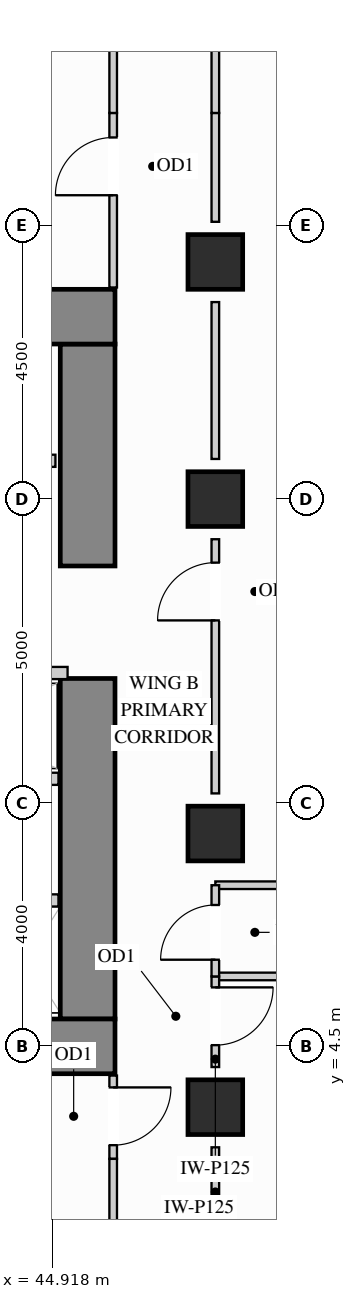
"""IFC4 building model, lengths in metres.
Left out: names, types, materials, properties, quantities, classifications, styles, units other than length and angle.
Written with IfcOpenShell. Run it as: python <this file> out.ifc"""

import sys

from ifc_helpers import new_model, si_unit, direction, frame, frame_2d, origin, origin_2d, place, context, subcontext, project, spatial, rectangle, extrude, source, transform, mapped, element, fill, save


model = new_model("IFC4")
c1 = context("Model", 3, precision=1e-05, world=origin(), true_north=direction((0.0, 1.0)))
c2 = subcontext(c1, "Body", "Model", "MODEL_VIEW")
j1 = project(units=[si_unit("LENGTHUNIT", "METRE"), si_unit("PLANEANGLEUNIT", "RADIAN")], contexts=[c1])
p1 = place(None, origin())
s1 = spatial("IfcSite", under=j1, at=p1, CompositionType="ELEMENT")
p2 = place(p1, origin())
s2 = spatial("IfcBuilding", under=s1, at=p2, CompositionType="ELEMENT")
p3 = place(p2, frame((0.0, 0.0, 22.5)))
s3 = spatial("IfcBuildingStorey", under=s2, at=p3, CompositionType="ELEMENT", Elevation=22.5)
m1 = source(origin(), c2, "Body", "SweptSolid", [
    extrude(rectangle(XDim=0.9, YDim=0.9, at=origin_2d()), origin(), (0.0, 0.0, 1.0), 3.38),
])
for number, where, z_axis, x_axis in (
    (1, (47.6, 13.5, 0.0), (0.0, 0.0, 1.0), (1.0, 0.0, 0.0)),
    (2, (47.6, 3.5, 0.0), (0.0, 0.0, 1.0), (1.0, 0.0, 0.0)),
    (3, (47.6, 8.0, 0.0), (0.0, 0.0, 1.0), (1.0, 0.0, 0.0)),
    (4, (47.6, 17.4, 0.0), (0.0, 0.0, 1.0), (1.0, 0.0, 0.0)),
):
    element("IfcColumn", number, at=place(p3, frame(where, z_axis=z_axis, x_axis=x_axis)), inside=s3, PredefinedType="COLUMN", context=c2, shape_type="MappedRepresentation", body=[
        mapped(m1, transform((0.0, 0.0, 0.0), x_axis=(1.0, 0.0, 0.0), y_axis=(0.0, 1.0, 0.0), z_axis=(0.0, 0.0, 1.0))),
    ])
m2 = source(origin(), c2, "Body", "SweptSolid", [
    extrude(rectangle(XDim=5.6, YDim=0.9, at=frame_2d((2.8, 0.0))), origin(), (0.0, 0.0, 1.0), 3.38),
])
p4 = place(p3, frame((45.5, 4.95, 0.0), z_axis=(0.0, 0.0, 1.0), x_axis=(0.0, 1.0, 0.0)))
e5 = element("IfcWall", 5, at=p4, inside=s3, PredefinedType="SHEAR", context=c2, shape_type="MappedRepresentation", body=[
    mapped(m2, transform((0.0, 0.0, 0.0), x_axis=(1.0, 0.0, 0.0), y_axis=(0.0, 1.0, 0.0), z_axis=(0.0, 0.0, 1.0))),
])
m3 = source(origin(), c2, "Body", "SweptSolid", [
    extrude(rectangle(XDim=3.65, YDim=0.9, at=frame_2d((1.825, 0.0))), origin(), (0.0, 0.0, 1.0), 3.38),
])
p5 = place(p3, frame((45.5, 12.4, 0.0), z_axis=(0.0, 0.0, 1.0), x_axis=(0.0, 1.0, 0.0)))
e6 = element("IfcWall", 6, at=p5, inside=s3, PredefinedType="SHEAR", context=c2, shape_type="MappedRepresentation", body=[
    mapped(m3, transform((0.0, 0.0, 0.0), x_axis=(1.0, 0.0, 0.0), y_axis=(0.0, 1.0, 0.0), z_axis=(0.0, 0.0, 1.0))),
])
m4 = source(origin(), c2, "Body", "SweptSolid", [
    extrude(rectangle(XDim=10.4, YDim=0.9, at=frame_2d((5.2, 0.0))), origin(), (0.0, 0.0, 1.0), 3.38),
])
for number, where, z_axis, x_axis in (
    (7, (35.55, 16.5, 0.0), (0.0, 0.0, 1.0), (1.0, 0.0, 0.0)),
    (8, (35.55, 4.5, 0.0), (0.0, 0.0, 1.0), (1.0, 0.0, 0.0)),
):
    element("IfcWall", number, at=place(p3, frame(where, z_axis=z_axis, x_axis=x_axis)), inside=s3, PredefinedType="SHEAR", context=c2, shape_type="MappedRepresentation", body=[
        mapped(m4, transform((0.0, 0.0, 0.0), x_axis=(1.0, 0.0, 0.0), y_axis=(0.0, 1.0, 0.0), z_axis=(0.0, 0.0, 1.0))),
    ])
m5 = source(origin(), c2, "Body", "SweptSolid", [
    extrude(rectangle(XDim=11.048, YDim=0.125, at=frame_2d((5.524, 0.0))), origin(), (0.0, 0.0, 1.0), 3.365),
])
for number, where, z_axis, x_axis in (
    (9, (47.6, 5.65, 0.0), (0.0, 0.0, 1.0), (1.0, 0.0, 0.0)),
    (10, (47.6, 7.15, 0.0), (0.0, 0.0, 1.0), (1.0, 0.0, 0.0)),
):
    element("IfcWall", number, at=place(p3, frame(where, z_axis=z_axis, x_axis=x_axis)), inside=s3, PredefinedType="PARTITIONING", context=c2, shape_type="MappedRepresentation", body=[
        mapped(m5, transform((0.0, 0.0, 0.0), x_axis=(1.0, 0.0, 0.0), y_axis=(0.0, 1.0, 0.0), z_axis=(0.0, 0.0, 1.0))),
    ])
p6 = place(p3, frame((47.6, 4.16, 0.0), z_axis=(0.0, 0.0, 1.0), x_axis=(0.0, 1.0, 0.0)))
e11 = element("IfcWall", 11, at=p6, inside=s3, PredefinedType="PARTITIONING", context=c2, shape_type="SweptSolid", body=[
    extrude(rectangle(XDim=1.49, YDim=0.125, at=frame_2d((0.745, 0.0))), origin(), (0.0, 0.0, 1.0), 2.67),
])
p7 = place(p6, frame((0.36, 0.0, 0.0)))
e12 = element("IfcOpeningElement", 12, at=p7, cuts=e11, PredefinedType="OPENING", context=c2, shape_type="SweptSolid", body=[
    extrude(rectangle(XDim=0.95, YDim=2.15, at=frame_2d((0.475, 1.075))), frame((0.0, 0.073, 0.0), z_axis=(0.0, -1.0, 0.0), x_axis=(1.0, 0.0, 0.0)), (0.0, 0.0, 1.0), 0.145),
])
m6 = source(origin(), c2, "Body", "SweptSolid", [
    extrude(rectangle(XDim=1.58, YDim=0.125, at=frame_2d((0.79, 0.0))), origin(), (0.0, 0.0, 1.0), 2.67),
])
p8 = place(p3, frame((47.6, 1.26, 0.0), z_axis=(0.0, 0.0, 1.0), x_axis=(0.0, 1.0, 0.0)))
e13 = element("IfcWall", 13, at=p8, inside=s3, PredefinedType="PARTITIONING", context=c2, shape_type="MappedRepresentation", body=[
    mapped(m6, transform((0.0, 0.0, 0.0), x_axis=(1.0, 0.0, 0.0), y_axis=(0.0, 1.0, 0.0), z_axis=(0.0, 0.0, 1.0))),
])
p9 = place(p3, frame((47.6, 8.66, 0.0), z_axis=(0.0, 0.0, 1.0), x_axis=(0.0, 1.0, 0.0)))
e14 = element("IfcWall", 14, at=p9, inside=s3, PredefinedType="PARTITIONING", context=c2, shape_type="SweptSolid", body=[
    extrude(rectangle(XDim=4.18, YDim=0.125, at=frame_2d((2.09, 0.0))), origin(), (0.0, 0.0, 1.0), 2.67),
])
p10 = place(p9, frame((2.845, 0.0, 0.0)))
e15 = element("IfcOpeningElement", 15, at=p10, cuts=e14, PredefinedType="OPENING", context=c2, shape_type="SweptSolid", body=[
    extrude(rectangle(XDim=0.95, YDim=2.15, at=frame_2d((0.475, 1.075))), frame((0.0, 0.073, 0.0), z_axis=(0.0, -1.0, 0.0), x_axis=(1.0, 0.0, 0.0)), (0.0, 0.0, 1.0), 0.145),
])
m7 = source(origin(), c2, "Body", "SweptSolid", [
    extrude(rectangle(XDim=2.58, YDim=0.125, at=frame_2d((1.29, 0.0))), origin(), (0.0, 0.0, 1.0), 2.67),
])
p11 = place(p3, frame((47.6, 14.16, 0.0), z_axis=(0.0, 0.0, 1.0), x_axis=(0.0, 1.0, 0.0)))
e16 = element("IfcWall", 16, at=p11, inside=s3, PredefinedType="PARTITIONING", context=c2, shape_type="MappedRepresentation", body=[
    mapped(m7, transform((0.0, 0.0, 0.0), x_axis=(1.0, 0.0, 0.0), y_axis=(0.0, 1.0, 0.0), z_axis=(0.0, 0.0, 1.0))),
])
m8 = source(origin(), c2, "Body", "SweptSolid", [
    extrude(rectangle(XDim=1.79, YDim=0.125, at=frame_2d((0.895, 0.0))), origin(), (0.0, 0.0, 1.0), 2.67),
])
p12 = place(p3, frame((47.6, 18.06, 0.0), z_axis=(0.0, 0.0, 1.0), x_axis=(0.0, 1.0, 0.0)))
e17 = element("IfcWall", 17, at=p12, inside=s3, PredefinedType="PARTITIONING", context=c2, shape_type="MappedRepresentation", body=[
    mapped(m8, transform((0.0, 0.0, 0.0), x_axis=(1.0, 0.0, 0.0), y_axis=(0.0, 1.0, 0.0), z_axis=(0.0, 0.0, 1.0))),
])
m9 = source(origin(), c2, "Body", "SweptSolid", [
    extrude(rectangle(XDim=1.39, YDim=0.125, at=frame_2d((0.695, 0.0))), origin(), (0.0, 0.0, 1.0), 2.67),
])
p13 = place(p3, frame((47.6, 19.85, 0.0), z_axis=(0.0, 0.0, 1.0), x_axis=(0.0, 1.0, 0.0)))
e18 = element("IfcWall", 18, at=p13, inside=s3, PredefinedType="PARTITIONING", context=c2, shape_type="MappedRepresentation", body=[
    mapped(m9, transform((0.0, 0.0, 0.0), x_axis=(1.0, 0.0, 0.0), y_axis=(0.0, 1.0, 0.0), z_axis=(0.0, 0.0, 1.0))),
])
p14 = place(p3, frame((47.6, 5.65, 0.0), z_axis=(0.0, 0.0, 1.0), x_axis=(0.0, 1.0, 0.0)))
e19 = element("IfcWall", 19, at=p14, inside=s3, PredefinedType="PARTITIONING", context=c2, shape_type="SweptSolid", body=[
    extrude(rectangle(XDim=1.5, YDim=0.125, at=frame_2d((0.75, 0.0))), origin(), (0.0, 0.0, 1.0), 2.67),
])
p15 = place(p14, frame((0.275, 0.0, 0.0)))
e20 = element("IfcOpeningElement", 20, at=p15, cuts=e19, PredefinedType="OPENING", context=c2, shape_type="SweptSolid", body=[
    extrude(rectangle(XDim=0.9, YDim=2.15, at=frame_2d((0.45, 1.075))), frame((0.0, 0.073, 0.0), z_axis=(0.0, -1.0, 0.0), x_axis=(1.0, 0.0, 0.0)), (0.0, 0.0, 1.0), 0.145),
])
p16 = place(p3, frame((45.92, 16.98, 0.0), z_axis=(0.0, 0.0, 1.0), x_axis=(0.0, 1.0, 0.0)))
e21 = element("IfcWall", 21, at=p16, inside=s3, PredefinedType="PARTITIONING", context=c2, shape_type="SweptSolid", body=[
    extrude(rectangle(XDim=2.87, YDim=0.125, at=frame_2d((1.435, 0.0))), origin(), (0.0, 0.0, 1.0), 3.365),
])
p17 = place(p16, frame((1.517, 0.0, 0.0)))
e22 = element("IfcOpeningElement", 22, at=p17, cuts=e21, PredefinedType="OPENING", context=c2, shape_type="SweptSolid", body=[
    extrude(rectangle(XDim=0.95, YDim=2.15, at=frame_2d((0.475, 1.075))), frame((0.0, 0.073, 0.0), z_axis=(0.0, -1.0, 0.0), x_axis=(1.0, 0.0, 0.0)), (0.0, 0.0, 1.0), 0.145),
])
m10 = source(origin(), c2, "Body", "SweptSolid", [
    extrude(rectangle(XDim=2.298, YDim=0.125, at=frame_2d((1.149, 0.0))), origin(), (0.0, 0.0, 1.0), 3.365),
])
p18 = place(p3, frame((45.92, 19.85, 0.0), z_axis=(0.0, 0.0, 1.0), x_axis=(0.0, 1.0, 0.0)))
e23 = element("IfcWall", 23, at=p18, inside=s3, PredefinedType="PARTITIONING", context=c2, shape_type="MappedRepresentation", body=[
    mapped(m10, transform((0.0, 0.0, 0.0), x_axis=(1.0, 0.0, 0.0), y_axis=(0.0, 1.0, 0.0), z_axis=(0.0, 0.0, 1.0))),
])
p19 = place(p3, frame((45.92, 2.65, 0.0), z_axis=(0.0, 0.0, 1.0), x_axis=(0.0, 1.0, 0.0)))
e24 = element("IfcWall", 24, at=p19, inside=s3, PredefinedType="PARTITIONING", context=c2, shape_type="SweptSolid", body=[
    extrude(rectangle(XDim=1.37, YDim=0.125, at=frame_2d((0.685, 0.0))), origin(), (0.0, 0.0, 1.0), 3.365),
])
p20 = place(p19, frame((0.225, 0.0, 0.0)))
e25 = element("IfcOpeningElement", 25, at=p20, cuts=e24, PredefinedType="OPENING", context=c2, shape_type="SweptSolid", body=[
    extrude(rectangle(XDim=0.95, YDim=2.15, at=frame_2d((0.475, 1.075))), frame((0.0, 0.073, 0.0), z_axis=(0.0, -1.0, 0.0), x_axis=(1.0, 0.0, 0.0)), (0.0, 0.0, 1.0), 0.145),
])
p21 = place(p3, frame((45.92, 0.352, 0.0), z_axis=(0.0, 0.0, 1.0), x_axis=(0.0, 1.0, 0.0)))
e26 = element("IfcWall", 26, at=p21, inside=s3, PredefinedType="PARTITIONING", context=c2, shape_type="MappedRepresentation", body=[
    mapped(m10, transform((0.0, 0.0, 0.0), x_axis=(1.0, 0.0, 0.0), y_axis=(0.0, 1.0, 0.0), z_axis=(0.0, 0.0, 1.0))),
])
m11 = source(origin(), c2, "Body", "SweptSolid", [
    extrude(rectangle(XDim=1.17, YDim=0.2, at=frame_2d((0.585, 0.0))), origin(), (0.0, 0.0, 1.0), 3.365),
])
p22 = place(p3, frame((43.85, 6.9, 0.0), z_axis=(0.0, 0.0, 1.0), x_axis=(1.0, 0.0, 0.0)))
e27 = element("IfcWall", 27, at=p22, inside=s3, PredefinedType="PARTITIONING", context=c2, shape_type="MappedRepresentation", body=[
    mapped(m11, transform((0.0, 0.0, 0.0), x_axis=(1.0, 0.0, 0.0), y_axis=(0.0, 1.0, 0.0), z_axis=(0.0, 0.0, 1.0))),
])
p23 = place(p3, frame((42.23, 14.13, 0.0), z_axis=(0.0, 0.0, 1.0), x_axis=(1.0, 0.0, 0.0)))
e28 = element("IfcWall", 28, at=p23, inside=s3, PredefinedType="PARTITIONING", context=c2, shape_type="SweptSolid", body=[
    extrude(rectangle(XDim=2.74, YDim=0.2, at=frame_2d((1.37, 0.0))), origin(), (0.0, 0.0, 1.0), 3.365),
])
p24 = place(p23, frame((0.82, 0.0, 0.0)))
e29 = element("IfcOpeningElement", 29, at=p24, cuts=e28, PredefinedType="OPENING", context=c2, shape_type="SweptSolid", body=[
    extrude(rectangle(XDim=1.1, YDim=2.2, at=frame_2d((0.55, 1.1))), frame((0.0, 0.11, 0.0), z_axis=(0.0, -1.0, 0.0), x_axis=(1.0, 0.0, 0.0)), (0.0, 0.0, 1.0), 0.22),
])
m12 = source(origin(), c2, "Body", "SweptSolid", [
    extrude(rectangle(XDim=3.49, YDim=0.2, at=frame_2d((1.745, 0.0))), origin(), (0.0, 0.0, 1.0), 3.365),
])
p25 = place(p3, frame((41.68, 10.64, 0.0), z_axis=(0.0, 0.0, 1.0), x_axis=(1.0, 0.0, 0.0)))
e30 = element("IfcWall", 30, at=p25, inside=s3, PredefinedType="PARTITIONING", context=c2, shape_type="MappedRepresentation", body=[
    mapped(m12, transform((0.0, 0.0, 0.0), x_axis=(1.0, 0.0, 0.0), y_axis=(0.0, 1.0, 0.0), z_axis=(0.0, 0.0, 1.0))),
])
m13 = source(origin(), c2, "Body", "SweptSolid", [
    extrude(rectangle(XDim=3.34, YDim=0.2, at=frame_2d((1.67, 0.0))), origin(), (0.0, 0.0, 1.0), 3.365),
])
p26 = place(p3, frame((41.68, 8.9, 0.0), z_axis=(0.0, 0.0, 1.0), x_axis=(1.0, 0.0, 0.0)))
e31 = element("IfcWall", 31, at=p26, inside=s3, PredefinedType="PARTITIONING", context=c2, shape_type="MappedRepresentation", body=[
    mapped(m13, transform((0.0, 0.0, 0.0), x_axis=(1.0, 0.0, 0.0), y_axis=(0.0, 1.0, 0.0), z_axis=(0.0, 0.0, 1.0))),
])
m14 = source(origin(), c2, "Body", "SweptSolid", [
    extrude(rectangle(XDim=0.95, YDim=2.15, at=frame_2d((0.475, 1.075))), frame((0.0, 0.025, 0.0), z_axis=(0.0, -1.0, 0.0), x_axis=(1.0, 0.0, 0.0)), (0.0, 0.0, 1.0), 0.05),
])
p27 = place(p17, origin())
e32 = element("IfcDoor", 32, at=p27, inside=s3, OperationType="SINGLE_SWING_LEFT", PredefinedType="DOOR", context=c2, shape_type="MappedRepresentation", body=[
    mapped(m14, transform((0.0, 0.0, 0.0), x_axis=(1.0, 0.0, 0.0), y_axis=(0.0, 1.0, 0.0), z_axis=(0.0, 0.0, 1.0))),
])
fill(e22, e32)
p28 = place(p20, origin())
e33 = element("IfcDoor", 33, at=p28, inside=s3, OperationType="SINGLE_SWING_RIGHT", PredefinedType="DOOR", context=c2, shape_type="MappedRepresentation", body=[
    mapped(m14, transform((0.0, 0.0, 0.0), x_axis=(1.0, 0.0, 0.0), y_axis=(0.0, 1.0, 0.0), z_axis=(0.0, 0.0, 1.0))),
])
fill(e25, e33)
p29 = place(p7, origin())
e34 = element("IfcDoor", 34, at=p29, inside=s3, OperationType="SINGLE_SWING_RIGHT", PredefinedType="DOOR", context=c2, shape_type="MappedRepresentation", body=[
    mapped(m14, transform((0.0, 0.0, 0.0), x_axis=(1.0, 0.0, 0.0), y_axis=(0.0, 1.0, 0.0), z_axis=(0.0, 0.0, 1.0))),
])
fill(e12, e34)
p30 = place(p10, origin())
e35 = element("IfcDoor", 35, at=p30, inside=s3, OperationType="SINGLE_SWING_LEFT", PredefinedType="DOOR", context=c2, shape_type="MappedRepresentation", body=[
    mapped(m14, transform((0.0, 0.0, 0.0), x_axis=(1.0, 0.0, 0.0), y_axis=(0.0, 1.0, 0.0), z_axis=(0.0, 0.0, 1.0))),
])
fill(e15, e35)
m15 = source(origin(), c2, "Body", "SweptSolid", [
    extrude(rectangle(XDim=0.9, YDim=2.15, at=frame_2d((0.45, 1.075))), frame((0.0, 0.025, 0.0), z_axis=(0.0, -1.0, 0.0), x_axis=(1.0, 0.0, 0.0)), (0.0, 0.0, 1.0), 0.05),
])
p31 = place(p15, origin())
e36 = element("IfcDoor", 36, at=p31, inside=s3, OperationType="SINGLE_SWING_LEFT", PredefinedType="DOOR", context=c2, shape_type="MappedRepresentation", body=[
    mapped(m15, transform((0.0, 0.0, 0.0), x_axis=(1.0, 0.0, 0.0), y_axis=(0.0, 1.0, 0.0), z_axis=(0.0, 0.0, 1.0))),
])
fill(e20, e36)
save(model, sys.argv[1])
